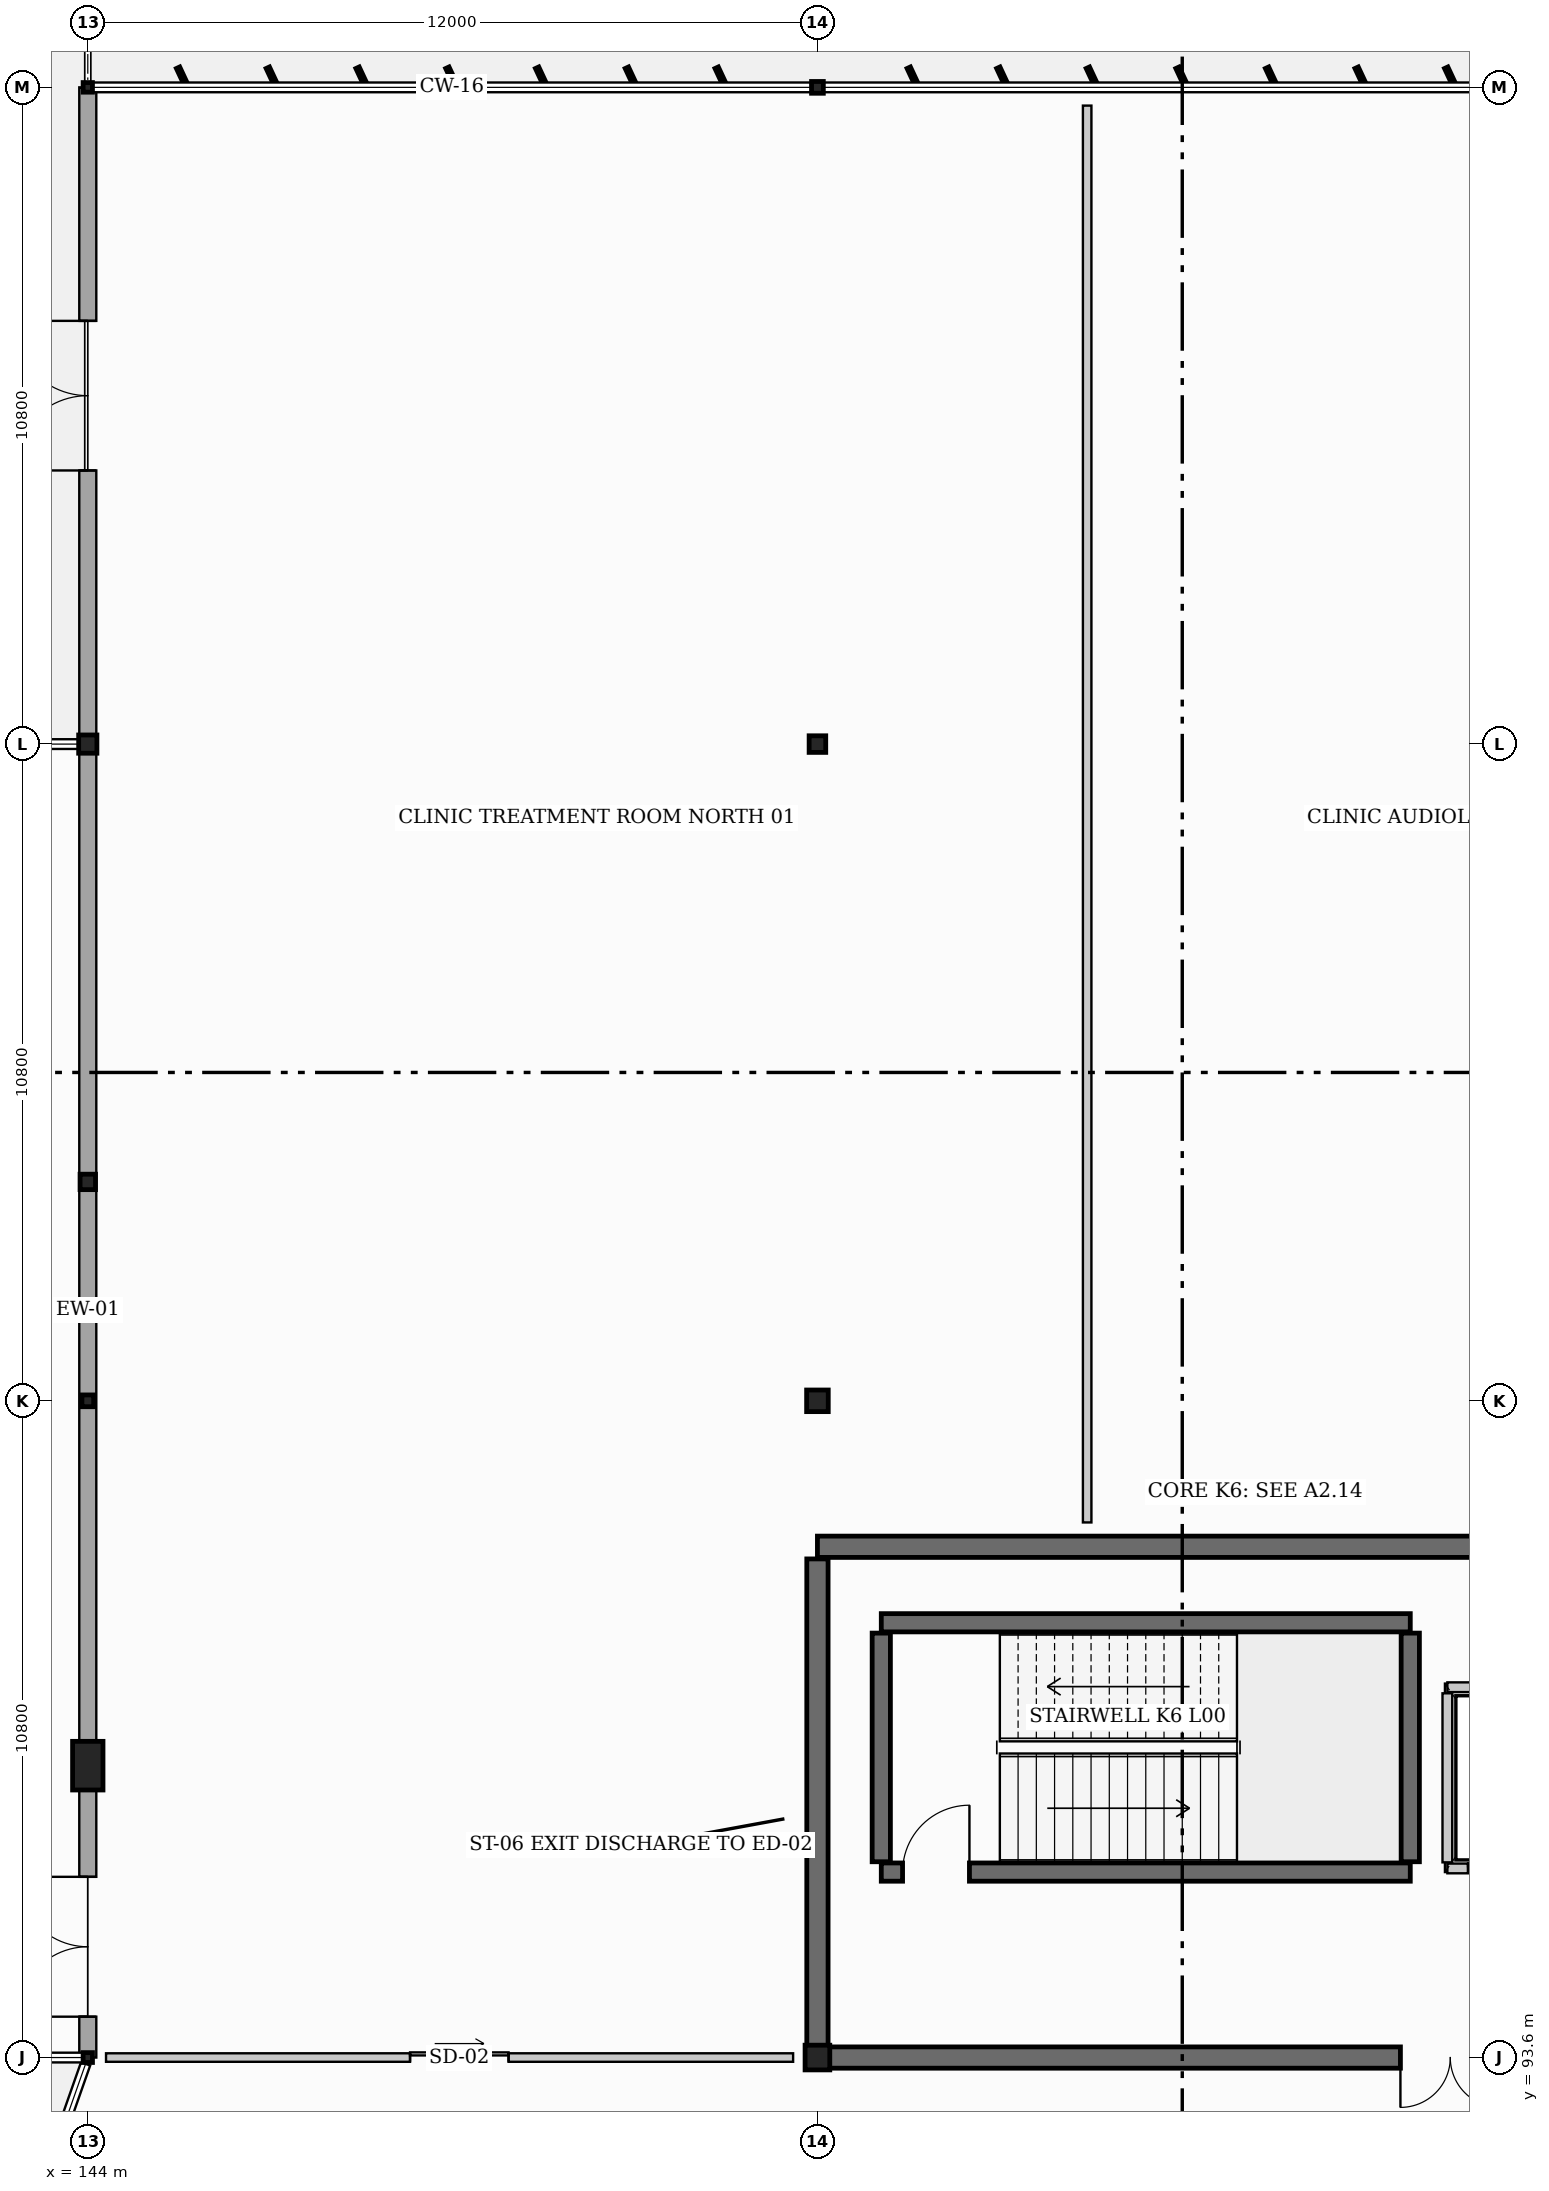
"""IFC4 building model, lengths in metres.
Left out: names, types, materials, properties, quantities, classifications, styles, units other than length and angle.
Written with IfcOpenShell. Run it as: python <this file> out.ifc"""

import sys

from ifc_helpers import new_model, si_unit, direction, frame, frame_2d, origin, origin_2d, place, context, subcontext, project, spatial, rectangle, hollow_rectangle, hollow_circle, i_section, extrude, element, fill, save


model = new_model("IFC4")
c1 = context("Model", 3, precision=1e-05, world=origin(), true_north=direction((0.0, 1.0)))
c2 = subcontext(c1, "Body", "Model", "MODEL_VIEW")
j1 = project(units=[si_unit("LENGTHUNIT", "METRE"), si_unit("PLANEANGLEUNIT", "RADIAN")], contexts=[c1])
p1 = place(None, origin())
s1 = spatial("IfcSite", under=j1, at=p1, CompositionType="ELEMENT")
p2 = place(p1, origin())
s2 = spatial("IfcBuilding", under=s1, at=p2, CompositionType="ELEMENT")
p3 = place(p2, origin())
s3 = spatial("IfcBuildingStorey", under=s2, at=p3, CompositionType="ELEMENT", Elevation=0.0)
p4 = place(p3, frame((144.0, 93.6, 0.0), z_axis=(0.0, 0.0, 1.0), x_axis=(1.0, 0.0, 0.0)))
e1 = element("IfcColumn", 1, at=p4, inside=s3, PredefinedType="COLUMN", context=c2, shape_type="SweptSolid", body=[
    extrude(i_section(OverallWidth=0.154, OverallDepth=0.162, WebThickness=0.008, FlangeThickness=0.011, at=origin_2d()), origin(), (0.0, 0.0, 1.0), 4.8),
])
p5 = place(p3, frame((144.0, 104.4, 0.0), z_axis=(0.0, 0.0, 1.0), x_axis=(1.0, 0.0, 0.0)))
e2 = element("IfcColumn", 2, at=p5, inside=s3, PredefinedType="COLUMN", context=c2, shape_type="SweptSolid", body=[
    extrude(hollow_circle(Radius=0.097, WallThickness=0.008, at=origin_2d()), origin(), (0.0, 0.0, 1.0), 4.8),
])
p6 = place(p3, frame((144.0, 115.2, 0.0), z_axis=(0.0, 0.0, 1.0), x_axis=(1.0, 0.0, 0.0)))
e3 = element("IfcColumn", 3, at=p6, inside=s3, PredefinedType="COLUMN", context=c2, shape_type="SweptSolid", body=[
    extrude(hollow_rectangle(XDim=0.3, YDim=0.3, WallThickness=0.012, at=origin_2d()), origin(), (0.0, 0.0, 1.0), 4.8),
])
p7 = place(p3, frame((144.0, 126.0, 0.0), z_axis=(0.0, 0.0, 1.0), x_axis=(1.0, 0.0, 0.0)))
e4 = element("IfcColumn", 4, at=p7, inside=s3, PredefinedType="COLUMN", context=c2, shape_type="SweptSolid", body=[
    extrude(i_section(OverallWidth=0.153, OverallDepth=0.158, WebThickness=0.007, FlangeThickness=0.01, at=origin_2d()), origin(), (0.0, 0.0, 1.0), 4.8),
])
p8 = place(p3, frame((156.0, 93.6, 0.0), z_axis=(0.0, 0.0, 1.0), x_axis=(0.0, 1.0, 0.0)))
e5 = element("IfcColumn", 5, at=p8, inside=s3, PredefinedType="COLUMN", context=c2, shape_type="SweptSolid", body=[
    extrude(hollow_circle(Radius=0.203, WallThickness=0.016, at=origin_2d()), origin(), (0.0, 0.0, 1.0), 4.8),
])
p9 = place(p3, frame((156.0, 104.4, 0.0), z_axis=(0.0, 0.0, 1.0), x_axis=(0.0, 1.0, 0.0)))
e6 = element("IfcColumn", 6, at=p9, inside=s3, PredefinedType="COLUMN", context=c2, shape_type="SweptSolid", body=[
    extrude(hollow_circle(Radius=0.178, WallThickness=0.013, at=origin_2d()), origin(), (0.0, 0.0, 1.0), 4.8),
])
p10 = place(p3, frame((156.0, 115.2, 0.0), z_axis=(0.0, 0.0, 1.0), x_axis=(0.0, 1.0, 0.0)))
e7 = element("IfcColumn", 7, at=p10, inside=s3, PredefinedType="COLUMN", context=c2, shape_type="SweptSolid", body=[
    extrude(hollow_circle(Radius=0.136, WallThickness=0.013, at=origin_2d()), origin(), (0.0, 0.0, 1.0), 4.8),
])
p11 = place(p3, frame((156.0, 126.0, 0.0), z_axis=(0.0, 0.0, 1.0), x_axis=(0.0, 1.0, 0.0)))
e8 = element("IfcColumn", 8, at=p11, inside=s3, PredefinedType="COLUMN", context=c2, shape_type="SweptSolid", body=[
    extrude(hollow_circle(Radius=0.097, WallThickness=0.008, at=origin_2d()), origin(), (0.0, 0.0, 1.0), 4.8),
])
p12 = place(p3, frame((144.0, 98.4, 0.0), z_axis=(0.0, 0.0, 1.0), x_axis=(1.0, 0.0, 0.0)))
e9 = element("IfcColumn", 9, at=p12, inside=s3, PredefinedType="PILASTER", context=c2, shape_type="SweptSolid", body=[
    extrude(rectangle(XDim=0.5, YDim=0.8, at=origin_2d()), origin(), (0.0, 0.0, 1.0), 4.8),
])
p13 = place(p3, frame((144.0, 108.0, 0.0), z_axis=(0.0, 0.0, 1.0), x_axis=(1.0, 0.0, 0.0)))
e10 = element("IfcColumn", 10, at=p13, inside=s3, PredefinedType="COLUMN", context=c2, shape_type="SweptSolid", body=[
    extrude(i_section(OverallWidth=0.254, OverallDepth=0.254, WebThickness=0.009, FlangeThickness=0.014, at=origin_2d()), origin(), (0.0, 0.0, 1.0), 4.8),
])
p14 = place(p3, frame((156.0, 102.0, 0.0), z_axis=(0.0, 0.0, 1.0), x_axis=(1.0, 0.0, 0.0)))
e11 = element("IfcWall", 11, at=p14, inside=s3, PredefinedType="SHEAR", context=c2, shape_type="SweptSolid", body=[
    extrude(rectangle(XDim=14.4, YDim=0.35, at=frame_2d((7.2, 0.0))), origin(), (0.0, 0.0, 1.0), 4.8),
])
p15 = place(p3, frame((170.4, 93.6, 0.0), z_axis=(0.0, 0.0, 1.0), x_axis=(-1.0, 0.0, 0.0)))
e12 = element("IfcWall", 12, at=p15, inside=s3, PredefinedType="SHEAR", context=c2, shape_type="SweptSolid", body=[
    extrude(rectangle(XDim=14.4, YDim=0.35, at=frame_2d((7.2, 0.0))), origin(), (0.0, 0.0, 1.0), 4.8),
])
p16 = place(p15, frame((3.172, 0.0, 0.0)))
e13 = element("IfcOpeningElement", 13, at=p16, cuts=e12, PredefinedType="OPENING", context=c2, shape_type="SweptSolid", body=[
    extrude(rectangle(XDim=1.64, YDim=2.2, at=frame_2d((0.82, 1.1))), frame((0.0, 0.185, 0.0), z_axis=(0.0, -1.0, 0.0), x_axis=(1.0, 0.0, 0.0)), (0.0, 0.0, 1.0), 0.37),
])
p17 = place(p3, frame((156.0, 93.8, 0.0), z_axis=(0.0, 0.0, 1.0), x_axis=(0.0, 1.0, 0.0)))
e14 = element("IfcWall", 14, at=p17, inside=s3, PredefinedType="SHEAR", context=c2, shape_type="SweptSolid", body=[
    extrude(rectangle(XDim=8.0, YDim=0.35, at=frame_2d((4.0, 0.0))), origin(), (0.0, 0.0, 1.0), 4.8),
])
p18 = place(p3, frame((157.05, 96.65, 0.0), z_axis=(0.0, 0.0, 1.0), x_axis=(1.0, 0.0, 0.0)))
e15 = element("IfcWall", 15, at=p18, inside=s3, PredefinedType="SHEAR", context=c2, shape_type="SweptSolid", body=[
    extrude(rectangle(XDim=8.7, YDim=0.3, at=frame_2d((4.35, 0.0))), origin(), (0.0, 0.0, 1.0), 4.8),
])
p19 = place(p18, frame((0.35, 0.0, 0.0)))
e16 = element("IfcOpeningElement", 16, at=p19, cuts=e15, PredefinedType="OPENING", context=c2, shape_type="SweptSolid", body=[
    extrude(rectangle(XDim=1.1, YDim=2.15, at=frame_2d((0.55, 1.075))), frame((0.0, 0.16, 0.0), z_axis=(0.0, -1.0, 0.0), x_axis=(1.0, 0.0, 0.0)), (0.0, 0.0, 1.0), 0.32),
])
p20 = place(p3, frame((165.75, 100.75, 0.0), z_axis=(0.0, 0.0, 1.0), x_axis=(-1.0, 0.0, 0.0)))
e17 = element("IfcWall", 17, at=p20, inside=s3, PredefinedType="SHEAR", context=c2, shape_type="SweptSolid", body=[
    extrude(rectangle(XDim=8.7, YDim=0.3, at=frame_2d((4.35, 0.0))), origin(), (0.0, 0.0, 1.0), 4.8),
])
for number, where, z_axis, x_axis in (
    (18, (157.05, 96.82, 0.0), (0.0, 0.0, 1.0), (0.0, 1.0, 0.0)),
    (19, (165.75, 96.82, 0.0), (0.0, 0.0, 1.0), (0.0, 1.0, 0.0)),
):
    element("IfcWall", number, at=place(p3, frame(where, z_axis=z_axis, x_axis=x_axis)), inside=s3, PredefinedType="SHEAR", context=c2, shape_type="SweptSolid", body=[
        extrude(rectangle(XDim=3.76, YDim=0.3, at=frame_2d((1.88, 0.0))), origin(), (0.0, 0.0, 1.0), 4.8),
    ])
p21 = place(p3, frame((144.0, 93.6, 0.0), z_axis=(0.0, 0.0, 1.0), x_axis=(0.0, 1.0, 0.0)))
e20 = element("IfcWall", 20, at=p21, inside=s3, PredefinedType="STANDARD", context=c2, shape_type="SweptSolid", body=[
    extrude(rectangle(XDim=21.6, YDim=0.28, at=frame_2d((10.8, 0.0))), origin(), (0.0, 0.0, 1.0), 3.48),
])
p22 = place(p21, frame((0.672, 0.0, 0.0)))
e21 = element("IfcOpeningElement", 21, at=p22, cuts=e20, PredefinedType="OPENING", context=c2, shape_type="SweptSolid", body=[
    extrude(rectangle(XDim=2.3, YDim=2.3, at=frame_2d((1.15, 1.15))), frame((0.0, 0.15, 0.0), z_axis=(0.0, -1.0, 0.0), x_axis=(1.0, 0.0, 0.0)), (0.0, 0.0, 1.0), 0.3),
])
p23 = place(p3, frame((144.0, 115.2, 0.0), z_axis=(0.0, 0.0, 1.0), x_axis=(0.0, 1.0, 0.0)))
e22 = element("IfcWall", 22, at=p23, inside=s3, PredefinedType="STANDARD", context=c2, shape_type="SweptSolid", body=[
    extrude(rectangle(XDim=10.8, YDim=0.28, at=frame_2d((5.4, 0.0))), origin(), (0.0, 0.0, 1.0), 3.48),
])
p24 = place(p23, frame((4.5, 0.0, 0.0)))
e23 = element("IfcOpeningElement", 23, at=p24, cuts=e22, PredefinedType="OPENING", context=c2, shape_type="SweptSolid", body=[
    extrude(rectangle(XDim=2.46, YDim=2.4, at=frame_2d((1.23, 1.2))), frame((0.0, 0.15, 0.0), z_axis=(0.0, -1.0, 0.0), x_axis=(1.0, 0.0, 0.0)), (0.0, 0.0, 1.0), 0.3),
])
p25 = place(p3, frame((166.36, 96.71, 0.0), z_axis=(0.0, 0.0, 1.0), x_axis=(1.0, 0.0, 0.0)))
e24 = element("IfcWall", 24, at=p25, inside=s3, PredefinedType="PARTITIONING", context=c2, shape_type="SweptSolid", body=[
    extrude(rectangle(XDim=2.08, YDim=0.16, at=frame_2d((1.04, 0.0))), origin(), (0.0, 0.0, 1.0), 4.445),
])
p26 = place(p25, frame((0.34, 0.0, 0.0)))
e25 = element("IfcOpeningElement", 25, at=p26, cuts=e24, PredefinedType="OPENING", context=c2, shape_type="SweptSolid", body=[
    extrude(rectangle(XDim=1.4, YDim=2.2, at=frame_2d((0.7, 1.1))), frame((0.0, 0.09, 0.0), z_axis=(0.0, -1.0, 0.0), x_axis=(1.0, 0.0, 0.0)), (0.0, 0.0, 1.0), 0.18),
])
p27 = place(p3, frame((168.44, 99.69, 0.0), z_axis=(0.0, 0.0, 1.0), x_axis=(-1.0, 0.0, 0.0)))
e26 = element("IfcWall", 26, at=p27, inside=s3, PredefinedType="PARTITIONING", context=c2, shape_type="SweptSolid", body=[
    extrude(rectangle(XDim=2.08, YDim=0.16, at=frame_2d((1.04, 0.0))), origin(), (0.0, 0.0, 1.0), 4.445),
])
p28 = place(p3, frame((166.36, 99.59, 0.0), z_axis=(0.0, 0.0, 1.0), x_axis=(0.0, -1.0, 0.0)))
e27 = element("IfcWall", 27, at=p28, inside=s3, PredefinedType="PARTITIONING", context=c2, shape_type="SweptSolid", body=[
    extrude(rectangle(XDim=2.78, YDim=0.16, at=frame_2d((1.39, 0.0))), origin(), (0.0, 0.0, 1.0), 4.445),
])
p29 = place(p3, frame((144.3, 93.6, 0.0), z_axis=(0.0, 0.0, 1.0), x_axis=(1.0, 0.0, 0.0)))
e28 = element("IfcWall", 28, at=p29, inside=s3, PredefinedType="PARTITIONING", context=c2, shape_type="SweptSolid", body=[
    extrude(rectangle(XDim=11.3, YDim=0.14, at=frame_2d((5.65, 0.0))), origin(), (0.0, 0.0, 1.0), 3.897),
])
p30 = place(p29, frame((5.0, 0.0, 0.0)))
e29 = element("IfcOpeningElement", 29, at=p30, cuts=e28, PredefinedType="OPENING", context=c2, shape_type="SweptSolid", body=[
    extrude(rectangle(XDim=1.62, YDim=2.3, at=frame_2d((0.81, 1.15))), frame((0.0, 0.08, 0.0), z_axis=(0.0, -1.0, 0.0), x_axis=(1.0, 0.0, 0.0)), (0.0, 0.0, 1.0), 0.16),
])
p31 = place(p3, frame((160.436, 102.4, 0.0), z_axis=(0.0, 0.0, 1.0), x_axis=(0.0, 1.0, 0.0)))
e30 = element("IfcWall", 30, at=p31, inside=s3, PredefinedType="PARTITIONING", context=c2, shape_type="SweptSolid", body=[
    extrude(rectangle(XDim=23.3, YDim=0.14, at=frame_2d((11.65, 0.0))), origin(), (0.0, 0.0, 1.0), 3.973),
])
p32 = place(p22, origin())
e31 = element("IfcDoor", 31, at=p32, inside=s3, OperationType="DOUBLE_DOOR_SINGLE_SWING", PredefinedType="DOOR", context=c2, shape_type="SweptSolid", body=[
    extrude(rectangle(XDim=2.3, YDim=2.3, at=frame_2d((1.15, 1.15))), frame((0.0, 0.025, 0.0), z_axis=(0.0, -1.0, 0.0), x_axis=(1.0, 0.0, 0.0)), (0.0, 0.0, 1.0), 0.05),
])
fill(e21, e31)
p33 = place(p24, origin())
e32 = element("IfcDoor", 32, at=p33, inside=s3, OperationType="DOUBLE_DOOR_SINGLE_SWING", PredefinedType="DOOR", context=c2, shape_type="SweptSolid", body=[
    extrude(rectangle(XDim=2.46, YDim=2.4, at=frame_2d((1.23, 1.2))), frame((0.0, 0.025, 0.0), z_axis=(0.0, -1.0, 0.0), x_axis=(1.0, 0.0, 0.0)), (0.0, 0.0, 1.0), 0.05),
])
fill(e23, e32)
p34 = place(p26, origin())
e33 = element("IfcDoor", 33, at=p34, inside=s3, OperationType="SLIDING_TO_LEFT", PredefinedType="DOOR", context=c2, shape_type="SweptSolid", body=[
    extrude(rectangle(XDim=1.4, YDim=2.2, at=frame_2d((0.7, 1.1))), frame((0.0, 0.025, 0.0), z_axis=(0.0, -1.0, 0.0), x_axis=(1.0, 0.0, 0.0)), (0.0, 0.0, 1.0), 0.05),
])
fill(e25, e33)
p35 = place(p19, origin())
e34 = element("IfcDoor", 34, at=p35, inside=s3, OperationType="SINGLE_SWING_RIGHT", PredefinedType="DOOR", context=c2, shape_type="SweptSolid", body=[
    extrude(rectangle(XDim=1.1, YDim=2.15, at=frame_2d((0.55, 1.075))), frame((0.0, 0.025, 0.0), z_axis=(0.0, -1.0, 0.0), x_axis=(1.0, 0.0, 0.0)), (0.0, 0.0, 1.0), 0.05),
])
fill(e16, e34)
p36 = place(p16, origin())
e35 = element("IfcDoor", 35, at=p36, inside=s3, OperationType="DOUBLE_DOOR_SINGLE_SWING", PredefinedType="DOOR", context=c2, shape_type="SweptSolid", body=[
    extrude(rectangle(XDim=1.64, YDim=2.2, at=frame_2d((0.82, 1.1))), frame((0.0, 0.025, 0.0), z_axis=(0.0, -1.0, 0.0), x_axis=(1.0, 0.0, 0.0)), (0.0, 0.0, 1.0), 0.05),
])
fill(e13, e35)
p37 = place(p30, origin())
e36 = element("IfcDoor", 36, at=p37, inside=s3, OperationType="SLIDING_TO_RIGHT", PredefinedType="DOOR", context=c2, shape_type="SweptSolid", body=[
    extrude(rectangle(XDim=1.62, YDim=2.3, at=frame_2d((0.81, 1.15))), frame((0.0, 0.025, 0.0), z_axis=(0.0, -1.0, 0.0), x_axis=(1.0, 0.0, 0.0)), (0.0, 0.0, 1.0), 0.05),
])
fill(e29, e36)
save(model, sys.argv[1])
